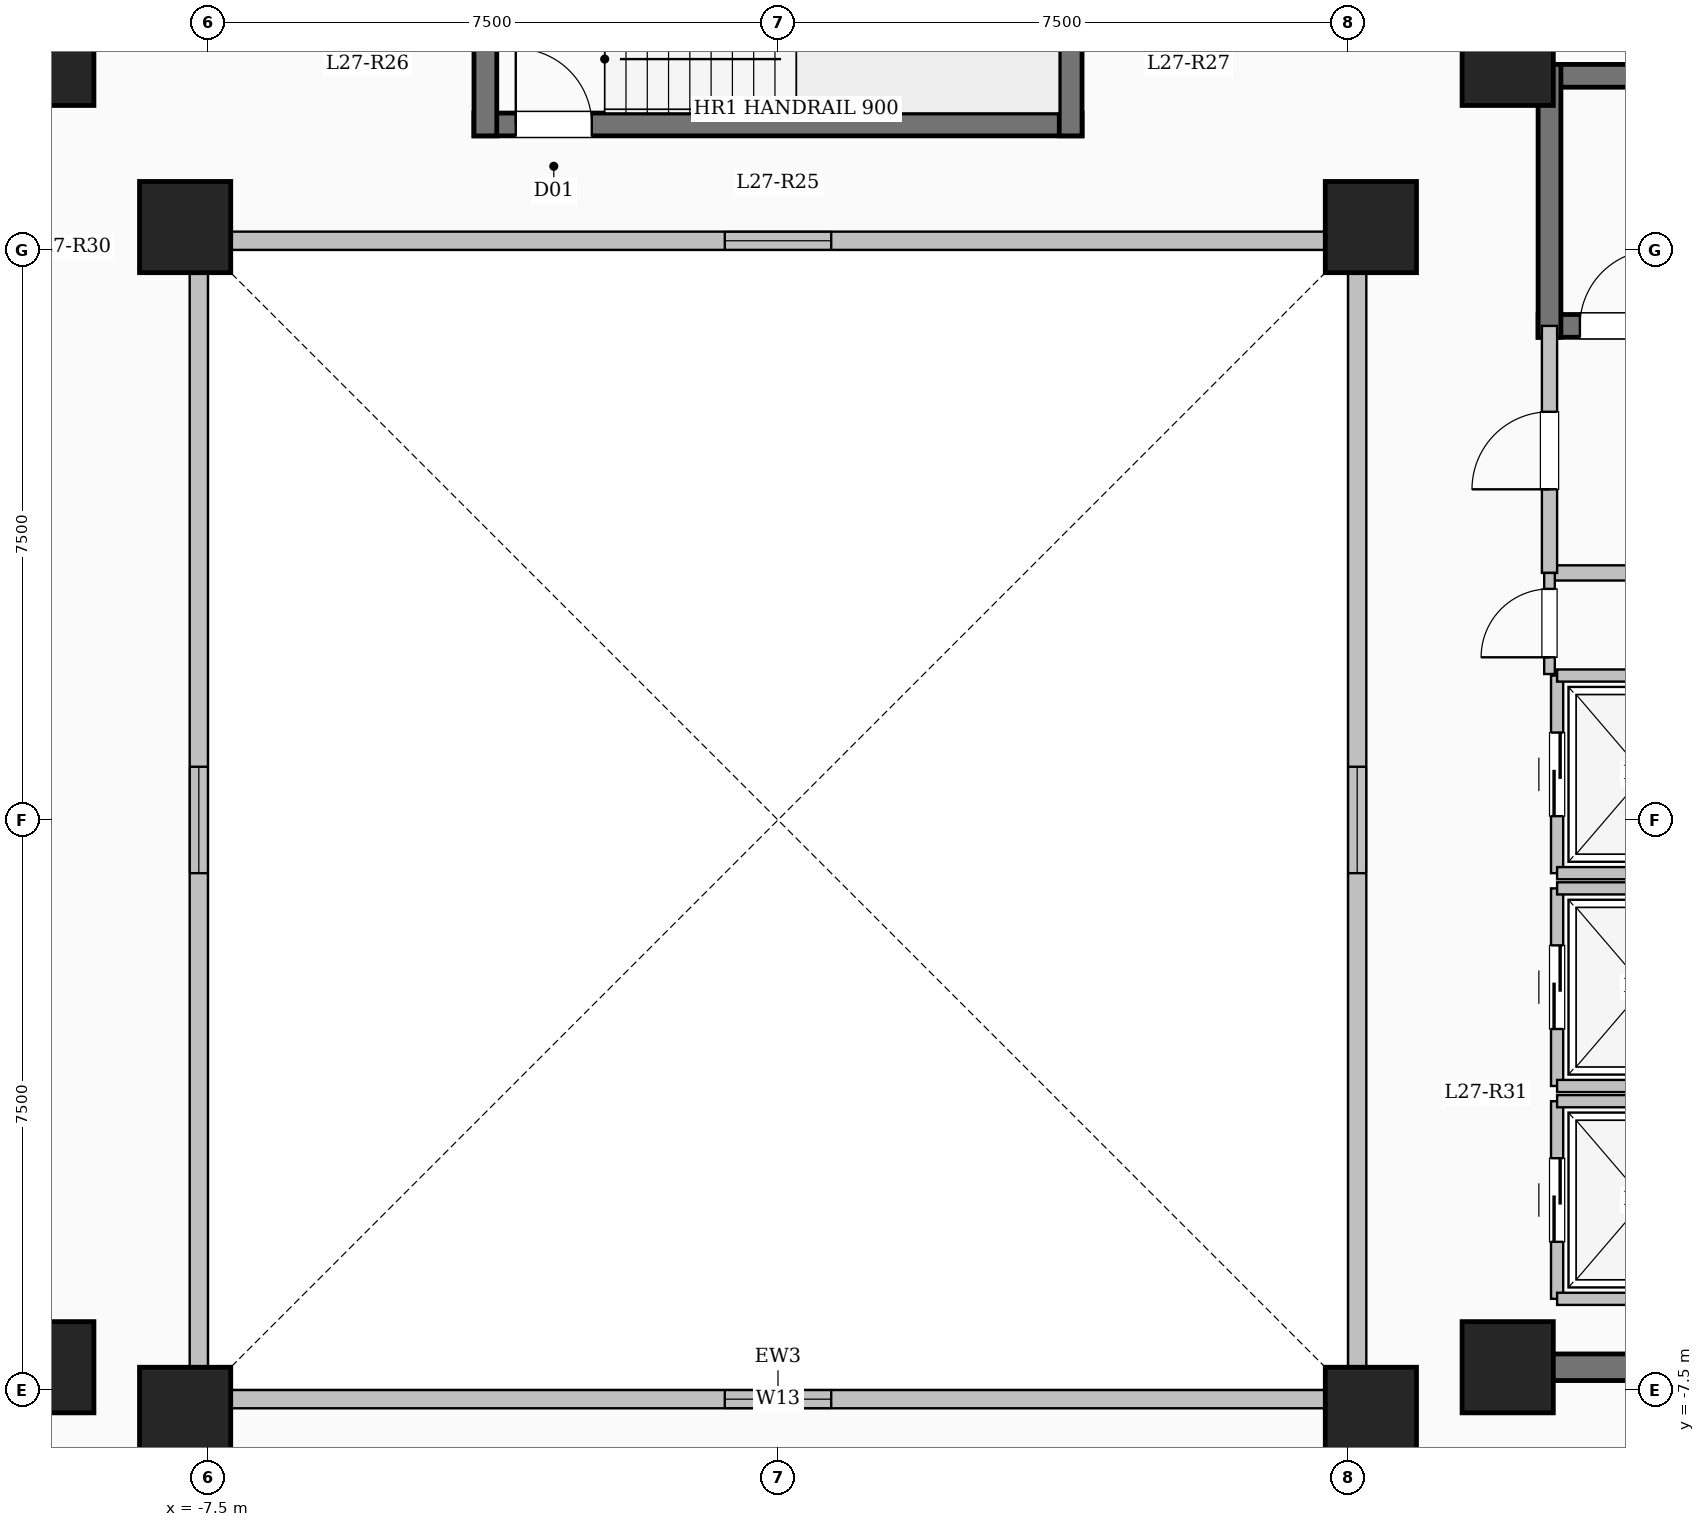
"""IFC4 building model, lengths in metres.
Left out: names, types, materials, properties, quantities, classifications, styles, units other than length and angle.
Written with IfcOpenShell. Run it as: python <this file> out.ifc"""

import sys

from ifc_helpers import new_model, si_unit, direction, frame, frame_2d, origin, origin_2d, place, context, subcontext, project, spatial, rectangle, extrude, element, fill, save


model = new_model("IFC4")
c1 = context("Model", 3, precision=1e-05, world=origin(), true_north=direction((0.0, 1.0)))
c2 = subcontext(c1, "Body", "Model", "MODEL_VIEW")
j1 = project(units=[si_unit("LENGTHUNIT", "METRE"), si_unit("PLANEANGLEUNIT", "RADIAN")], contexts=[c1])
p1 = place(None, origin())
s1 = spatial("IfcSite", under=j1, at=p1, CompositionType="ELEMENT")
p2 = place(p1, origin())
s2 = spatial("IfcBuilding", under=s1, at=p2, CompositionType="ELEMENT")
p3 = place(p2, frame((0.0, 0.0, 101.75)))
s3 = spatial("IfcBuildingStorey", under=s2, at=p3, CompositionType="ELEMENT", Elevation=101.75)
for number, where, z_axis, x_axis in (
    (1, (-7.8, -7.8, 0.0), (0.0, 0.0, 1.0), (1.0, 0.0, 0.0)),
    (2, (7.8, -7.8, 0.0), (0.0, 0.0, 1.0), (1.0, 0.0, 0.0)),
    (3, (-7.8, 7.8, 0.0), (0.0, 0.0, 1.0), (1.0, 0.0, 0.0)),
    (4, (7.8, 7.8, 0.0), (0.0, 0.0, 1.0), (1.0, 0.0, 0.0)),
    (5, (-9.6, -7.2, 0.0), (0.0, 0.0, 1.0), (1.0, 0.0, 0.0)),
    (6, (-9.6, 10.0, 0.0), (0.0, 0.0, 1.0), (1.0, 0.0, 0.0)),
    (7, (9.6, -7.2, 0.0), (0.0, 0.0, 1.0), (1.0, 0.0, 0.0)),
    (8, (9.6, 10.0, 0.0), (0.0, 0.0, 1.0), (1.0, 0.0, 0.0)),
):
    element("IfcColumn", number, at=place(p3, frame(where, z_axis=z_axis, x_axis=x_axis)), inside=s3, PredefinedType="COLUMN", context=c2, shape_type="SweptSolid", body=[
        extrude(rectangle(XDim=1.2, YDim=1.2, at=origin_2d()), origin(), (0.0, 0.0, 1.0), 3.35),
    ])
p4 = place(p3, frame((-7.62, -7.62, 0.0), z_axis=(0.0, 0.0, 1.0), x_axis=(1.0, 0.0, 0.0)))
e9 = element("IfcWall", 9, at=p4, inside=s3, PredefinedType="SOLIDWALL", context=c2, shape_type="SweptSolid", body=[
    extrude(rectangle(XDim=15.24, YDim=0.24, at=frame_2d((7.62, 0.0))), origin(), (0.0, 0.0, 1.0), 3.1),
])
p5 = place(p4, frame((6.92, 0.0, 0.95)))
e10 = element("IfcOpeningElement", 10, at=p5, cuts=e9, PredefinedType="OPENING", context=c2, shape_type="SweptSolid", body=[
    extrude(rectangle(XDim=1.4, YDim=1.5, at=frame_2d((0.7, 0.75))), frame((0.0, 0.13, 0.0), z_axis=(0.0, -1.0, 0.0), x_axis=(1.0, 0.0, 0.0)), (0.0, 0.0, 1.0), 0.26),
])
p6 = place(p3, frame((7.62, -7.62, 0.0), z_axis=(0.0, 0.0, 1.0), x_axis=(0.0, 1.0, 0.0)))
e11 = element("IfcWall", 11, at=p6, inside=s3, PredefinedType="SOLIDWALL", context=c2, shape_type="SweptSolid", body=[
    extrude(rectangle(XDim=15.24, YDim=0.24, at=frame_2d((7.62, 0.0))), origin(), (0.0, 0.0, 1.0), 3.1),
])
p7 = place(p6, frame((6.92, 0.0, 0.95)))
e12 = element("IfcOpeningElement", 12, at=p7, cuts=e11, PredefinedType="OPENING", context=c2, shape_type="SweptSolid", body=[
    extrude(rectangle(XDim=1.4, YDim=1.5, at=frame_2d((0.7, 0.75))), frame((0.0, 0.13, 0.0), z_axis=(0.0, -1.0, 0.0), x_axis=(1.0, 0.0, 0.0)), (0.0, 0.0, 1.0), 0.26),
])
p8 = place(p3, frame((7.62, 7.62, 0.0), z_axis=(0.0, 0.0, 1.0), x_axis=(-1.0, 0.0, 0.0)))
e13 = element("IfcWall", 13, at=p8, inside=s3, PredefinedType="SOLIDWALL", context=c2, shape_type="SweptSolid", body=[
    extrude(rectangle(XDim=15.24, YDim=0.24, at=frame_2d((7.62, 0.0))), origin(), (0.0, 0.0, 1.0), 3.1),
])
p9 = place(p8, frame((6.92, 0.0, 0.95)))
e14 = element("IfcOpeningElement", 14, at=p9, cuts=e13, PredefinedType="OPENING", context=c2, shape_type="SweptSolid", body=[
    extrude(rectangle(XDim=1.4, YDim=1.5, at=frame_2d((0.7, 0.75))), frame((0.0, 0.13, 0.0), z_axis=(0.0, -1.0, 0.0), x_axis=(1.0, 0.0, 0.0)), (0.0, 0.0, 1.0), 0.26),
])
p10 = place(p3, frame((-7.62, 7.62, 0.0), z_axis=(0.0, 0.0, 1.0), x_axis=(0.0, -1.0, 0.0)))
e15 = element("IfcWall", 15, at=p10, inside=s3, PredefinedType="SOLIDWALL", context=c2, shape_type="SweptSolid", body=[
    extrude(rectangle(XDim=15.24, YDim=0.24, at=frame_2d((7.62, 0.0))), origin(), (0.0, 0.0, 1.0), 3.1),
])
p11 = place(p10, frame((6.92, 0.0, 0.95)))
e16 = element("IfcOpeningElement", 16, at=p11, cuts=e15, PredefinedType="OPENING", context=c2, shape_type="SweptSolid", body=[
    extrude(rectangle(XDim=1.4, YDim=1.5, at=frame_2d((0.7, 0.75))), frame((0.0, 0.13, 0.0), z_axis=(0.0, -1.0, 0.0), x_axis=(1.0, 0.0, 0.0)), (0.0, 0.0, 1.0), 0.26),
])
p12 = place(p3, frame((10.0, 9.79, 0.0), z_axis=(0.0, 0.0, 1.0), x_axis=(1.0, 0.0, 0.0)))
e17 = element("IfcWall", 17, at=p12, inside=s3, PredefinedType="SHEAR", context=c2, shape_type="SweptSolid", body=[
    extrude(rectangle(XDim=8.0, YDim=0.3, at=frame_2d((4.0, 0.0))), origin(), (0.0, 0.0, 1.0), 3.35),
])
p13 = place(p3, frame((10.0, 6.5, 0.0), z_axis=(0.0, 0.0, 1.0), x_axis=(1.0, 0.0, 0.0)))
e18 = element("IfcWall", 18, at=p13, inside=s3, PredefinedType="SHEAR", context=c2, shape_type="SweptSolid", body=[
    extrude(rectangle(XDim=8.0, YDim=0.3, at=frame_2d((4.0, 0.0))), origin(), (0.0, 0.0, 1.0), 3.35),
])
p14 = place(p13, frame((0.55, 0.0, 0.0)))
e19 = element("IfcOpeningElement", 19, at=p14, cuts=e18, PredefinedType="OPENING", context=c2, shape_type="SweptSolid", body=[
    extrude(rectangle(XDim=1.0, YDim=2.15, at=frame_2d((0.5, 1.075))), frame((0.0, 0.16, 0.0), z_axis=(0.0, -1.0, 0.0), x_axis=(1.0, 0.0, 0.0)), (0.0, 0.0, 1.0), 0.32),
])
p15 = place(p3, frame((10.15, 6.35, 0.0), z_axis=(0.0, 0.0, 1.0), x_axis=(0.0, 1.0, 0.0)))
e20 = element("IfcWall", 20, at=p15, inside=s3, PredefinedType="SHEAR", context=c2, shape_type="SweptSolid", body=[
    extrude(rectangle(XDim=3.59, YDim=0.3, at=frame_2d((1.795, 0.0))), origin(), (0.0, 0.0, 1.0), 3.35),
])
p16 = place(p3, frame((-4.0, 9.15, 0.0), z_axis=(0.0, 0.0, 1.0), x_axis=(1.0, 0.0, 0.0)))
e21 = element("IfcWall", 21, at=p16, inside=s3, PredefinedType="SHEAR", context=c2, shape_type="SweptSolid", body=[
    extrude(rectangle(XDim=8.0, YDim=0.3, at=frame_2d((4.0, 0.0))), origin(), (0.0, 0.0, 1.0), 3.35),
])
p17 = place(p16, frame((0.55, 0.0, 0.0)))
e22 = element("IfcOpeningElement", 22, at=p17, cuts=e21, PredefinedType="OPENING", context=c2, shape_type="SweptSolid", body=[
    extrude(rectangle(XDim=1.0, YDim=2.15, at=frame_2d((0.5, 1.075))), frame((0.0, 0.16, 0.0), z_axis=(0.0, -1.0, 0.0), x_axis=(1.0, 0.0, 0.0)), (0.0, 0.0, 1.0), 0.32),
])
for number, where, z_axis, x_axis in (
    (23, (-3.85, 9.0, 0.0), (0.0, 0.0, 1.0), (0.0, 1.0, 0.0)),
    (24, (3.85, 9.0, 0.0), (0.0, 0.0, 1.0), (0.0, 1.0, 0.0)),
):
    element("IfcWall", number, at=place(p3, frame(where, z_axis=z_axis, x_axis=x_axis)), inside=s3, PredefinedType="SHEAR", context=c2, shape_type="SweptSolid", body=[
        extrude(rectangle(XDim=3.59, YDim=0.3, at=frame_2d((1.795, 0.0))), origin(), (0.0, 0.0, 1.0), 3.35),
    ])
p18 = place(p3, frame((10.15, 3.25, 0.0), z_axis=(0.0, 0.0, 1.0), x_axis=(1.0, 0.0, 0.0)))
e25 = element("IfcWall", 25, at=p18, inside=s3, PredefinedType="SOLIDWALL", context=c2, shape_type="SweptSolid", body=[
    extrude(rectangle(XDim=5.4, YDim=0.2, at=frame_2d((2.7, 0.0))), origin(), (0.0, 0.0, 1.0), 3.1),
])
p19 = place(p3, frame((10.15, 3.25, 0.0), z_axis=(0.0, 0.0, 1.0), x_axis=(0.0, 1.0, 0.0)))
e26 = element("IfcWall", 26, at=p19, inside=s3, PredefinedType="SOLIDWALL", context=c2, shape_type="SweptSolid", body=[
    extrude(rectangle(XDim=3.25, YDim=0.2, at=frame_2d((1.625, 0.0))), origin(), (0.0, 0.0, 1.0), 3.1),
])
p20 = place(p19, frame((1.1, 0.0, 0.0)))
e27 = element("IfcOpeningElement", 27, at=p20, cuts=e26, PredefinedType="OPENING", context=c2, shape_type="SweptSolid", body=[
    extrude(rectangle(XDim=1.02, YDim=2.15, at=frame_2d((0.51, 1.075))), frame((0.0, 0.11, 0.0), z_axis=(0.0, -1.0, 0.0), x_axis=(1.0, 0.0, 0.0)), (0.0, 0.0, 1.0), 0.22),
])
p21 = place(p3, frame((10.25, -6.3, 0.0), z_axis=(0.0, 0.0, 1.0), x_axis=(0.0, 1.0, 0.0)))
e28 = element("IfcWall", 28, at=p21, inside=s3, PredefinedType="SOLIDWALL", context=c2, shape_type="SweptSolid", body=[
    extrude(rectangle(XDim=2.6, YDim=0.16, at=frame_2d((1.3, 0.0))), origin(), (0.0, 0.0, 1.0), 3.1),
])
p22 = place(p21, frame((0.75, 0.0, 0.0)))
e29 = element("IfcOpeningElement", 29, at=p22, cuts=e28, PredefinedType="OPENING", context=c2, shape_type="SweptSolid", body=[
    extrude(rectangle(XDim=1.1, YDim=2.15, at=frame_2d((0.55, 1.075))), frame((0.0, 0.09, 0.0), z_axis=(0.0, -1.0, 0.0), x_axis=(1.0, 0.0, 0.0)), (0.0, 0.0, 1.0), 0.18),
])
for number, where, z_axis, x_axis in (
    (30, (10.25, -6.3, 0.0), (0.0, 0.0, 1.0), (1.0, 0.0, 0.0)),
    (31, (10.25, -3.7, 0.0), (0.0, 0.0, 1.0), (1.0, 0.0, 0.0)),
):
    element("IfcWall", number, at=place(p3, frame(where, z_axis=z_axis, x_axis=x_axis)), inside=s3, PredefinedType="SOLIDWALL", context=c2, shape_type="SweptSolid", body=[
        extrude(rectangle(XDim=2.3, YDim=0.16, at=frame_2d((1.15, 0.0))), origin(), (0.0, 0.0, 1.0), 3.1),
    ])
p23 = place(p3, frame((10.25, -3.5, 0.0), z_axis=(0.0, 0.0, 1.0), x_axis=(0.0, 1.0, 0.0)))
e32 = element("IfcWall", 32, at=p23, inside=s3, PredefinedType="SOLIDWALL", context=c2, shape_type="SweptSolid", body=[
    extrude(rectangle(XDim=2.6, YDim=0.16, at=frame_2d((1.3, 0.0))), origin(), (0.0, 0.0, 1.0), 3.1),
])
p24 = place(p23, frame((0.75, 0.0, 0.0)))
e33 = element("IfcOpeningElement", 33, at=p24, cuts=e32, PredefinedType="OPENING", context=c2, shape_type="SweptSolid", body=[
    extrude(rectangle(XDim=1.1, YDim=2.15, at=frame_2d((0.55, 1.075))), frame((0.0, 0.09, 0.0), z_axis=(0.0, -1.0, 0.0), x_axis=(1.0, 0.0, 0.0)), (0.0, 0.0, 1.0), 0.18),
])
for number, where, z_axis, x_axis in (
    (34, (10.25, -3.5, 0.0), (0.0, 0.0, 1.0), (1.0, 0.0, 0.0)),
    (35, (10.25, -0.9, 0.0), (0.0, 0.0, 1.0), (1.0, 0.0, 0.0)),
):
    element("IfcWall", number, at=place(p3, frame(where, z_axis=z_axis, x_axis=x_axis)), inside=s3, PredefinedType="SOLIDWALL", context=c2, shape_type="SweptSolid", body=[
        extrude(rectangle(XDim=2.3, YDim=0.16, at=frame_2d((1.15, 0.0))), origin(), (0.0, 0.0, 1.0), 3.1),
    ])
p25 = place(p3, frame((10.25, -0.7, 0.0), z_axis=(0.0, 0.0, 1.0), x_axis=(0.0, 1.0, 0.0)))
e36 = element("IfcWall", 36, at=p25, inside=s3, PredefinedType="SOLIDWALL", context=c2, shape_type="SweptSolid", body=[
    extrude(rectangle(XDim=2.6, YDim=0.16, at=frame_2d((1.3, 0.0))), origin(), (0.0, 0.0, 1.0), 3.1),
])
p26 = place(p25, frame((0.75, 0.0, 0.0)))
e37 = element("IfcOpeningElement", 37, at=p26, cuts=e36, PredefinedType="OPENING", context=c2, shape_type="SweptSolid", body=[
    extrude(rectangle(XDim=1.1, YDim=2.15, at=frame_2d((0.55, 1.075))), frame((0.0, 0.09, 0.0), z_axis=(0.0, -1.0, 0.0), x_axis=(1.0, 0.0, 0.0)), (0.0, 0.0, 1.0), 0.18),
])
for number, where, z_axis, x_axis in (
    (38, (10.25, -0.7, 0.0), (0.0, 0.0, 1.0), (1.0, 0.0, 0.0)),
    (39, (10.25, 1.9, 0.0), (0.0, 0.0, 1.0), (1.0, 0.0, 0.0)),
):
    element("IfcWall", number, at=place(p3, frame(where, z_axis=z_axis, x_axis=x_axis)), inside=s3, PredefinedType="SOLIDWALL", context=c2, shape_type="SweptSolid", body=[
        extrude(rectangle(XDim=2.3, YDim=0.16, at=frame_2d((1.15, 0.0))), origin(), (0.0, 0.0, 1.0), 3.1),
    ])
p27 = place(p3, frame((10.075, -7.2, 0.0), z_axis=(0.0, 0.0, 1.0), x_axis=(1.0, 0.0, 0.0)))
e40 = element("IfcWall", 40, at=p27, inside=s3, PredefinedType="SHEAR", context=c2, shape_type="SweptSolid", body=[
    extrude(rectangle(XDim=8.55, YDim=0.35, at=frame_2d((4.275, 0.0))), origin(), (0.0, 0.0, 1.0), 3.35),
])
p28 = place(p3, frame((10.15, 1.92, 0.0), z_axis=(0.0, 0.0, 1.0), x_axis=(0.0, 1.0, 0.0)))
e41 = element("IfcWall", 41, at=p28, inside=s3, PredefinedType="PARTITIONING", context=c2, shape_type="SweptSolid", body=[
    extrude(rectangle(XDim=1.33, YDim=0.14, at=frame_2d((0.665, 0.0))), origin(), (0.0, 0.0, 1.0), 3.1),
])
p29 = place(p28, frame((0.22, 0.0, 0.0)))
e42 = element("IfcOpeningElement", 42, at=p29, cuts=e41, PredefinedType="OPENING", context=c2, shape_type="SweptSolid", body=[
    extrude(rectangle(XDim=0.9, YDim=2.08, at=frame_2d((0.45, 1.04))), frame((0.0, 0.08, 0.0), z_axis=(0.0, -1.0, 0.0), x_axis=(1.0, 0.0, 0.0)), (0.0, 0.0, 1.0), 0.16),
])
p30 = place(p5, origin())
e43 = element("IfcWindow", 43, at=p30, inside=s3, PartitioningType="SINGLE_PANEL", PredefinedType="WINDOW", context=c2, shape_type="SweptSolid", body=[
    extrude(rectangle(XDim=1.4, YDim=1.5, at=frame_2d((0.7, 0.75))), frame((0.0, 0.03, 0.0), z_axis=(0.0, -1.0, 0.0), x_axis=(1.0, 0.0, 0.0)), (0.0, 0.0, 1.0), 0.06),
])
fill(e10, e43)
p31 = place(p7, origin())
e44 = element("IfcWindow", 44, at=p31, inside=s3, PartitioningType="SINGLE_PANEL", PredefinedType="WINDOW", context=c2, shape_type="SweptSolid", body=[
    extrude(rectangle(XDim=1.4, YDim=1.5, at=frame_2d((0.7, 0.75))), frame((0.0, 0.03, 0.0), z_axis=(0.0, -1.0, 0.0), x_axis=(1.0, 0.0, 0.0)), (0.0, 0.0, 1.0), 0.06),
])
fill(e12, e44)
p32 = place(p9, origin())
e45 = element("IfcWindow", 45, at=p32, inside=s3, PartitioningType="SINGLE_PANEL", PredefinedType="WINDOW", context=c2, shape_type="SweptSolid", body=[
    extrude(rectangle(XDim=1.4, YDim=1.5, at=frame_2d((0.7, 0.75))), frame((0.0, 0.03, 0.0), z_axis=(0.0, -1.0, 0.0), x_axis=(1.0, 0.0, 0.0)), (0.0, 0.0, 1.0), 0.06),
])
fill(e14, e45)
p33 = place(p11, origin())
e46 = element("IfcWindow", 46, at=p33, inside=s3, PartitioningType="SINGLE_PANEL", PredefinedType="WINDOW", context=c2, shape_type="SweptSolid", body=[
    extrude(rectangle(XDim=1.4, YDim=1.5, at=frame_2d((0.7, 0.75))), frame((0.0, 0.03, 0.0), z_axis=(0.0, -1.0, 0.0), x_axis=(1.0, 0.0, 0.0)), (0.0, 0.0, 1.0), 0.06),
])
fill(e16, e46)
p34 = place(p14, origin())
e47 = element("IfcDoor", 47, at=p34, inside=s3, OperationType="SINGLE_SWING_RIGHT", PredefinedType="DOOR", context=c2, shape_type="SweptSolid", body=[
    extrude(rectangle(XDim=1.0, YDim=2.15, at=frame_2d((0.5, 1.075))), frame((0.0, 0.025, 0.0), z_axis=(0.0, -1.0, 0.0), x_axis=(1.0, 0.0, 0.0)), (0.0, 0.0, 1.0), 0.05),
])
fill(e19, e47)
p35 = place(p17, origin())
e48 = element("IfcDoor", 48, at=p35, inside=s3, OperationType="SINGLE_SWING_LEFT", PredefinedType="DOOR", context=c2, shape_type="SweptSolid", body=[
    extrude(rectangle(XDim=1.0, YDim=2.15, at=frame_2d((0.5, 1.075))), frame((0.0, 0.025, 0.0), z_axis=(0.0, -1.0, 0.0), x_axis=(1.0, 0.0, 0.0)), (0.0, 0.0, 1.0), 0.05),
])
fill(e22, e48)
p36 = place(p20, origin())
e49 = element("IfcDoor", 49, at=p36, inside=s3, OperationType="SINGLE_SWING_LEFT", PredefinedType="DOOR", context=c2, shape_type="SweptSolid", body=[
    extrude(rectangle(XDim=1.02, YDim=2.15, at=frame_2d((0.51, 1.075))), frame((0.0, 0.025, 0.0), z_axis=(0.0, -1.0, 0.0), x_axis=(1.0, 0.0, 0.0)), (0.0, 0.0, 1.0), 0.05),
])
fill(e27, e49)
p37 = place(p22, origin())
e50 = element("IfcDoor", 50, at=p37, inside=s3, OperationType="SLIDING_TO_LEFT", PredefinedType="DOOR", context=c2, shape_type="SweptSolid", body=[
    extrude(rectangle(XDim=1.1, YDim=2.15, at=frame_2d((0.55, 1.075))), frame((0.0, 0.025, 0.0), z_axis=(0.0, -1.0, 0.0), x_axis=(1.0, 0.0, 0.0)), (0.0, 0.0, 1.0), 0.05),
])
fill(e29, e50)
p38 = place(p24, origin())
e51 = element("IfcDoor", 51, at=p38, inside=s3, OperationType="SLIDING_TO_LEFT", PredefinedType="DOOR", context=c2, shape_type="SweptSolid", body=[
    extrude(rectangle(XDim=1.1, YDim=2.15, at=frame_2d((0.55, 1.075))), frame((0.0, 0.025, 0.0), z_axis=(0.0, -1.0, 0.0), x_axis=(1.0, 0.0, 0.0)), (0.0, 0.0, 1.0), 0.05),
])
fill(e33, e51)
p39 = place(p26, origin())
e52 = element("IfcDoor", 52, at=p39, inside=s3, OperationType="SLIDING_TO_LEFT", PredefinedType="DOOR", context=c2, shape_type="SweptSolid", body=[
    extrude(rectangle(XDim=1.1, YDim=2.15, at=frame_2d((0.55, 1.075))), frame((0.0, 0.025, 0.0), z_axis=(0.0, -1.0, 0.0), x_axis=(1.0, 0.0, 0.0)), (0.0, 0.0, 1.0), 0.05),
])
fill(e37, e52)
p40 = place(p29, origin())
e53 = element("IfcDoor", 53, at=p40, inside=s3, OperationType="SINGLE_SWING_LEFT", PredefinedType="DOOR", context=c2, shape_type="SweptSolid", body=[
    extrude(rectangle(XDim=0.9, YDim=2.08, at=frame_2d((0.45, 1.04))), frame((0.0, 0.025, 0.0), z_axis=(0.0, -1.0, 0.0), x_axis=(1.0, 0.0, 0.0)), (0.0, 0.0, 1.0), 0.05),
])
fill(e42, e53)
save(model, sys.argv[1])
